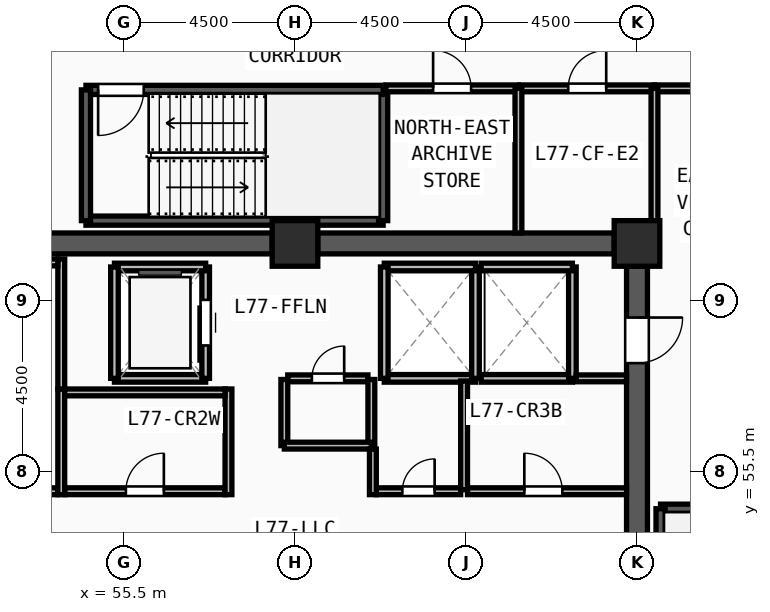
"""IFC4 building model, lengths in metres.
Left out: names, types, materials, properties, quantities, classifications, styles, units other than length and angle.
Written with IfcOpenShell. Run it as: python <this file> out.ifc"""

import sys

from ifc_helpers import new_model, si_unit, direction, frame, frame_2d, origin, origin_2d, place, context, subcontext, project, spatial, rectangle, extrude, source, transform, mapped, element, fill, save


model = new_model("IFC4")
c1 = context("Model", 3, precision=1e-05, world=origin(), true_north=direction((0.0, 1.0)))
c2 = subcontext(c1, "Body", "Model", "MODEL_VIEW")
j1 = project(units=[si_unit("LENGTHUNIT", "METRE"), si_unit("PLANEANGLEUNIT", "RADIAN")], contexts=[c1])
p1 = place(None, origin())
s1 = spatial("IfcSite", under=j1, at=p1, CompositionType="ELEMENT")
p2 = place(p1, origin())
s2 = spatial("IfcBuilding", under=s1, at=p2, CompositionType="ELEMENT")
p3 = place(p2, frame((0.0, 0.0, 297.75)))
s3 = spatial("IfcBuildingStorey", under=s2, at=p3, CompositionType="ELEMENT", Elevation=297.75)
m1 = source(origin(), c2, "Body", "SweptSolid", [
    extrude(rectangle(XDim=1.2, YDim=1.2, at=origin_2d()), origin(), (0.0, 0.0, 1.0), 3.75),
])
for number, where, z_axis, x_axis in (
    (1, (69.0, 61.5, 0.0), (0.0, 0.0, 1.0), (1.0, 0.0, 0.0)),
    (2, (60.0, 61.5, 0.0), (0.0, 0.0, 1.0), (1.0, 0.0, 0.0)),
):
    element("IfcColumn", number, at=place(p3, frame(where, z_axis=z_axis, x_axis=x_axis)), inside=s3, PredefinedType="COLUMN", context=c2, shape_type="MappedRepresentation", body=[
        mapped(m1, transform((0.0, 0.0, 0.0), x_axis=(1.0, 0.0, 0.0), y_axis=(0.0, 1.0, 0.0), z_axis=(0.0, 0.0, 1.0), scale=1.0)),
    ])
for number, where, z_axis, x_axis in (
    (3, (51.6, 61.5, 0.0), (0.0, 0.0, 1.0), (1.0, 0.0, 0.0)),
    (4, (60.6, 61.5, 0.0), (0.0, 0.0, 1.0), (1.0, 0.0, 0.0)),
):
    element("IfcWall", number, at=place(p3, frame(where, z_axis=z_axis, x_axis=x_axis)), inside=s3, PredefinedType="SHEAR", context=c2, shape_type="SweptSolid", body=[
        extrude(rectangle(XDim=7.8, YDim=0.55, at=frame_2d((3.9, 0.0))), origin(), (0.0, 0.0, 1.0), 3.57),
    ])
p4 = place(p3, frame((69.0, 60.9, 0.0), z_axis=(0.0, 0.0, 1.0), x_axis=(0.0, -1.0, 0.0)))
e5 = element("IfcWall", 5, at=p4, inside=s3, PredefinedType="SHEAR", context=c2, shape_type="SweptSolid", body=[
    extrude(rectangle(XDim=13.8, YDim=0.55, at=frame_2d((6.9, 0.0))), origin(), (0.0, 0.0, 1.0), 3.57),
])
m2 = source(origin(), c2, "Body", "SweptSolid", [
    extrude(rectangle(XDim=1.2, YDim=2.2, at=frame_2d((0.6, 1.1))), frame((0.0, 0.285, 0.0), z_axis=(0.0, -1.0, 0.0), x_axis=(1.0, 0.0, 0.0)), (0.0, 0.0, 1.0), 0.57),
])
p5 = place(p4, frame((1.35, 0.0, 0.0)))
e6 = element("IfcOpeningElement", 6, at=p5, cuts=e5, PredefinedType="OPENING", context=c2, shape_type="MappedRepresentation", body=[
    mapped(m2, transform((0.0, 0.0, 0.0), x_axis=(1.0, 0.0, 0.0), y_axis=(0.0, 1.0, 0.0), z_axis=(0.0, 0.0, 1.0), scale=1.0)),
])
p6 = place(p3, frame((73.06, 54.52, 0.0), z_axis=(0.0, 0.0, 1.0), x_axis=(-1.0, 0.0, 0.0)))
e7 = element("IfcWall", 7, at=p6, inside=s3, PredefinedType="SOLIDWALL", context=c2, shape_type="SweptSolid", body=[
    extrude(rectangle(XDim=3.44, YDim=0.24, at=frame_2d((1.72, 0.0))), origin(), (0.0, 0.0, 1.0), 3.57),
])
for number, where, z_axis, x_axis in (
    (8, (69.62, 54.52, 0.0), (0.0, 0.0, 1.0), (0.0, -1.0, 0.0)),
    (9, (54.5, 62.1, 0.0), (0.0, 0.0, 1.0), (1.0, 0.0, 0.0)),
):
    element("IfcWall", number, at=place(p3, frame(where, z_axis=z_axis, x_axis=x_axis)), inside=s3, PredefinedType="SOLIDWALL", context=c2, shape_type="SweptSolid", body=[
        extrude(rectangle(XDim=7.82, YDim=0.24, at=frame_2d((3.91, 0.0))), origin(), (0.0, 0.0, 1.0), 3.57),
    ])
p7 = place(p3, frame((62.32, 62.1, 0.0), z_axis=(0.0, 0.0, 1.0), x_axis=(0.0, 1.0, 0.0)))
e10 = element("IfcWall", 10, at=p7, inside=s3, PredefinedType="SOLIDWALL", context=c2, shape_type="SweptSolid", body=[
    extrude(rectangle(XDim=3.44, YDim=0.24, at=frame_2d((1.72, 0.0))), origin(), (0.0, 0.0, 1.0), 3.57),
])
p8 = place(p3, frame((62.32, 65.54, 0.0), z_axis=(0.0, 0.0, 1.0), x_axis=(-1.0, 0.0, 0.0)))
e11 = element("IfcWall", 11, at=p8, inside=s3, PredefinedType="SOLIDWALL", context=c2, shape_type="SweptSolid", body=[
    extrude(rectangle(XDim=7.82, YDim=0.24, at=frame_2d((3.91, 0.0))), origin(), (0.0, 0.0, 1.0), 3.57),
])
m3 = source(origin(), c2, "Body", "SweptSolid", [
    extrude(rectangle(XDim=1.2, YDim=2.2, at=frame_2d((0.6, 1.1))), frame((0.0, 0.13, 0.0), z_axis=(0.0, -1.0, 0.0), x_axis=(1.0, 0.0, 0.0)), (0.0, 0.0, 1.0), 0.26),
])
p9 = place(p8, frame((6.3, 0.0, 0.0)))
e12 = element("IfcOpeningElement", 12, at=p9, cuts=e11, PredefinedType="OPENING", context=c2, shape_type="MappedRepresentation", body=[
    mapped(m3, transform((0.0, 0.0, 0.0), x_axis=(1.0, 0.0, 0.0), y_axis=(0.0, 1.0, 0.0), z_axis=(0.0, 0.0, 1.0), scale=1.0)),
])
p10 = place(p3, frame((54.5, 65.54, 0.0), z_axis=(0.0, 0.0, 1.0), x_axis=(0.0, -1.0, 0.0)))
e13 = element("IfcWall", 13, at=p10, inside=s3, PredefinedType="SOLIDWALL", context=c2, shape_type="SweptSolid", body=[
    extrude(rectangle(XDim=3.44, YDim=0.24, at=frame_2d((1.72, 0.0))), origin(), (0.0, 0.0, 1.0), 3.57),
])
p11 = place(p3, frame((55.25, 57.95, 0.0), z_axis=(0.0, 0.0, 1.0), x_axis=(1.0, 0.0, 0.0)))
e14 = element("IfcWall", 14, at=p11, inside=s3, PredefinedType="SOLIDWALL", context=c2, shape_type="SweptSolid", body=[
    extrude(rectangle(XDim=2.4, YDim=0.2, at=frame_2d((1.2, 0.0))), origin(), (0.0, 0.0, 1.0), 3.57),
])
p12 = place(p3, frame((57.65, 57.95, 0.0), z_axis=(0.0, 0.0, 1.0), x_axis=(0.0, 1.0, 0.0)))
e15 = element("IfcWall", 15, at=p12, inside=s3, PredefinedType="SOLIDWALL", context=c2, shape_type="SweptSolid", body=[
    extrude(rectangle(XDim=2.93, YDim=0.2, at=frame_2d((1.465, 0.0))), origin(), (0.0, 0.0, 1.0), 3.57),
])
m4 = source(origin(), c2, "Body", "SweptSolid", [
    extrude(rectangle(XDim=1.2, YDim=2.3, at=frame_2d((0.6, 1.15))), frame((0.0, 0.11, 0.0), z_axis=(0.0, -1.0, 0.0), x_axis=(1.0, 0.0, 0.0)), (0.0, 0.0, 1.0), 0.22),
])
p13 = place(p12, frame((0.865, 0.0, 0.0)))
e16 = element("IfcOpeningElement", 16, at=p13, cuts=e15, PredefinedType="OPENING", context=c2, shape_type="MappedRepresentation", body=[
    mapped(m4, transform((0.0, 0.0, 0.0), x_axis=(1.0, 0.0, 0.0), y_axis=(0.0, 1.0, 0.0), z_axis=(0.0, 0.0, 1.0), scale=1.0)),
])
p14 = place(p3, frame((57.65, 60.88, 0.0), z_axis=(0.0, 0.0, 1.0), x_axis=(-1.0, 0.0, 0.0)))
e17 = element("IfcWall", 17, at=p14, inside=s3, PredefinedType="SOLIDWALL", context=c2, shape_type="SweptSolid", body=[
    extrude(rectangle(XDim=2.4, YDim=0.2, at=frame_2d((1.2, 0.0))), origin(), (0.0, 0.0, 1.0), 3.57),
])
p15 = place(p3, frame((55.25, 60.88, 0.0), z_axis=(0.0, 0.0, 1.0), x_axis=(0.0, -1.0, 0.0)))
e18 = element("IfcWall", 18, at=p15, inside=s3, PredefinedType="SOLIDWALL", context=c2, shape_type="SweptSolid", body=[
    extrude(rectangle(XDim=2.93, YDim=0.2, at=frame_2d((1.465, 0.0))), origin(), (0.0, 0.0, 1.0), 3.57),
])
p16 = place(p3, frame((62.35, 57.95, 0.0), z_axis=(0.0, 0.0, 1.0), x_axis=(1.0, 0.0, 0.0)))
e19 = element("IfcWall", 19, at=p16, inside=s3, PredefinedType="SOLIDWALL", context=c2, shape_type="SweptSolid", body=[
    extrude(rectangle(XDim=2.4, YDim=0.2, at=frame_2d((1.2, 0.0))), origin(), (0.0, 0.0, 1.0), 3.57),
])
p17 = place(p3, frame((64.75, 57.95, 0.0), z_axis=(0.0, 0.0, 1.0), x_axis=(0.0, 1.0, 0.0)))
e20 = element("IfcWall", 20, at=p17, inside=s3, PredefinedType="SOLIDWALL", context=c2, shape_type="SweptSolid", body=[
    extrude(rectangle(XDim=2.93, YDim=0.2, at=frame_2d((1.465, 0.0))), origin(), (0.0, 0.0, 1.0), 3.57),
])
p18 = place(p3, frame((64.75, 60.88, 0.0), z_axis=(0.0, 0.0, 1.0), x_axis=(-1.0, 0.0, 0.0)))
e21 = element("IfcWall", 21, at=p18, inside=s3, PredefinedType="SOLIDWALL", context=c2, shape_type="SweptSolid", body=[
    extrude(rectangle(XDim=2.4, YDim=0.2, at=frame_2d((1.2, 0.0))), origin(), (0.0, 0.0, 1.0), 3.57),
])
p19 = place(p3, frame((62.35, 60.88, 0.0), z_axis=(0.0, 0.0, 1.0), x_axis=(0.0, -1.0, 0.0)))
e22 = element("IfcWall", 22, at=p19, inside=s3, PredefinedType="SOLIDWALL", context=c2, shape_type="SweptSolid", body=[
    extrude(rectangle(XDim=2.93, YDim=0.2, at=frame_2d((1.465, 0.0))), origin(), (0.0, 0.0, 1.0), 3.57),
])
p20 = place(p3, frame((64.9, 57.95, 0.0), z_axis=(0.0, 0.0, 1.0), x_axis=(1.0, 0.0, 0.0)))
e23 = element("IfcWall", 23, at=p20, inside=s3, PredefinedType="SOLIDWALL", context=c2, shape_type="SweptSolid", body=[
    extrude(rectangle(XDim=2.4, YDim=0.2, at=frame_2d((1.2, 0.0))), origin(), (0.0, 0.0, 1.0), 3.57),
])
p21 = place(p3, frame((67.3, 57.95, 0.0), z_axis=(0.0, 0.0, 1.0), x_axis=(0.0, 1.0, 0.0)))
e24 = element("IfcWall", 24, at=p21, inside=s3, PredefinedType="SOLIDWALL", context=c2, shape_type="SweptSolid", body=[
    extrude(rectangle(XDim=2.93, YDim=0.2, at=frame_2d((1.465, 0.0))), origin(), (0.0, 0.0, 1.0), 3.57),
])
p22 = place(p3, frame((67.3, 60.88, 0.0), z_axis=(0.0, 0.0, 1.0), x_axis=(-1.0, 0.0, 0.0)))
e25 = element("IfcWall", 25, at=p22, inside=s3, PredefinedType="SOLIDWALL", context=c2, shape_type="SweptSolid", body=[
    extrude(rectangle(XDim=2.4, YDim=0.2, at=frame_2d((1.2, 0.0))), origin(), (0.0, 0.0, 1.0), 3.57),
])
p23 = place(p3, frame((53.94, 54.98, 0.0), z_axis=(0.0, 0.0, 1.0), x_axis=(1.0, 0.0, 0.0)))
e26 = element("IfcWall", 26, at=p23, inside=s3, PredefinedType="PARTITIONING", context=c2, shape_type="SweptSolid", body=[
    extrude(rectangle(XDim=4.22, YDim=0.18, at=frame_2d((2.11, 0.0))), origin(), (0.0, 0.0, 1.0), 3.57),
])
m5 = source(origin(), c2, "Body", "SweptSolid", [
    extrude(rectangle(XDim=1.0, YDim=2.2, at=frame_2d((0.5, 1.1))), frame((0.0, 0.1, 0.0), z_axis=(0.0, -1.0, 0.0), x_axis=(1.0, 0.0, 0.0)), (0.0, 0.0, 1.0), 0.2),
])
p24 = place(p23, frame((1.61, 0.0, 0.0)))
e27 = element("IfcOpeningElement", 27, at=p24, cuts=e26, PredefinedType="OPENING", context=c2, shape_type="MappedRepresentation", body=[
    mapped(m5, transform((0.0, 0.0, 0.0), x_axis=(1.0, 0.0, 0.0), y_axis=(0.0, 1.0, 0.0), z_axis=(0.0, 0.0, 1.0), scale=1.0)),
])
p25 = place(p3, frame((51.275, 54.98, 0.0), z_axis=(0.0, 0.0, 1.0), x_axis=(1.0, 0.0, 0.0)))
e28 = element("IfcWall", 28, at=p25, inside=s3, PredefinedType="PARTITIONING", context=c2, shape_type="SweptSolid", body=[
    extrude(rectangle(XDim=2.485, YDim=0.18, at=frame_2d((1.243, 0.0))), origin(), (0.0, 0.0, 1.0), 3.57),
])
m6 = source(origin(), c2, "Body", "SweptSolid", [
    extrude(rectangle(XDim=0.85, YDim=2.1, at=frame_2d((0.425, 1.05))), frame((0.0, 0.1, 0.0), z_axis=(0.0, -1.0, 0.0), x_axis=(1.0, 0.0, 0.0)), (0.0, 0.0, 1.0), 0.2),
])
p26 = place(p25, frame((0.915, 0.0, 0.0)))
e29 = element("IfcOpeningElement", 29, at=p26, cuts=e28, PredefinedType="OPENING", context=c2, shape_type="MappedRepresentation", body=[
    mapped(m6, transform((0.0, 0.0, 0.0), x_axis=(1.0, 0.0, 0.0), y_axis=(0.0, 1.0, 0.0), z_axis=(0.0, 0.0, 1.0), scale=1.0)),
])
p27 = place(p3, frame((62.14, 54.98, 0.0), z_axis=(0.0, 0.0, 1.0), x_axis=(1.0, 0.0, 0.0)))
e30 = element("IfcWall", 30, at=p27, inside=s3, PredefinedType="PARTITIONING", context=c2, shape_type="SweptSolid", body=[
    extrude(rectangle(XDim=2.22, YDim=0.18, at=frame_2d((1.11, 0.0))), origin(), (0.0, 0.0, 1.0), 3.57),
])
p28 = place(p27, frame((0.685, 0.0, 0.0)))
e31 = element("IfcOpeningElement", 31, at=p28, cuts=e30, PredefinedType="OPENING", context=c2, shape_type="MappedRepresentation", body=[
    mapped(m6, transform((0.0, 0.0, 0.0), x_axis=(1.0, 0.0, 0.0), y_axis=(0.0, 1.0, 0.0), z_axis=(0.0, 0.0, 1.0), scale=1.0)),
])
p29 = place(p3, frame((64.54, 54.98, 0.0), z_axis=(0.0, 0.0, 1.0), x_axis=(1.0, 0.0, 0.0)))
e32 = element("IfcWall", 32, at=p29, inside=s3, PredefinedType="PARTITIONING", context=c2, shape_type="SweptSolid", body=[
    extrude(rectangle(XDim=4.185, YDim=0.18, at=frame_2d((2.093, 0.0))), origin(), (0.0, 0.0, 1.0), 3.57),
])
p30 = place(p29, frame((1.495, 0.0, 0.0)))
e33 = element("IfcOpeningElement", 33, at=p30, cuts=e32, PredefinedType="OPENING", context=c2, shape_type="MappedRepresentation", body=[
    mapped(m5, transform((0.0, 0.0, 0.0), x_axis=(1.0, 0.0, 0.0), y_axis=(0.0, 1.0, 0.0), z_axis=(0.0, 0.0, 1.0), scale=1.0)),
])
p31 = place(p3, frame((59.81, 57.95, 0.0), z_axis=(0.0, 0.0, 1.0), x_axis=(1.0, 0.0, 0.0)))
e34 = element("IfcWall", 34, at=p31, inside=s3, PredefinedType="PARTITIONING", context=c2, shape_type="SweptSolid", body=[
    extrude(rectangle(XDim=2.11, YDim=0.18, at=frame_2d((1.055, 0.0))), origin(), (0.0, 0.0, 1.0), 3.57),
])
p32 = place(p31, frame((0.635, 0.0, 0.0)))
e35 = element("IfcOpeningElement", 35, at=p32, cuts=e34, PredefinedType="OPENING", context=c2, shape_type="MappedRepresentation", body=[
    mapped(m6, transform((0.0, 0.0, 0.0), x_axis=(1.0, 0.0, 0.0), y_axis=(0.0, 1.0, 0.0), z_axis=(0.0, 0.0, 1.0), scale=1.0)),
])
p33 = place(p3, frame((62.39, 65.58, 0.0), z_axis=(0.0, 0.0, 1.0), x_axis=(1.0, 0.0, 0.0)))
e36 = element("IfcWall", 36, at=p33, inside=s3, PredefinedType="PARTITIONING", context=c2, shape_type="SweptSolid", body=[
    extrude(rectangle(XDim=3.49, YDim=0.18, at=frame_2d((1.745, 0.0))), origin(), (0.0, 0.0, 1.0), 3.57),
])
p34 = place(p33, frame((1.245, 0.0, 0.0)))
e37 = element("IfcOpeningElement", 37, at=p34, cuts=e36, PredefinedType="OPENING", context=c2, shape_type="MappedRepresentation", body=[
    mapped(m5, transform((0.0, 0.0, 0.0), x_axis=(1.0, 0.0, 0.0), y_axis=(0.0, 1.0, 0.0), z_axis=(0.0, 0.0, 1.0), scale=1.0)),
])
p35 = place(p3, frame((65.92, 65.58, 0.0), z_axis=(0.0, 0.0, 1.0), x_axis=(1.0, 0.0, 0.0)))
e38 = element("IfcWall", 38, at=p35, inside=s3, PredefinedType="PARTITIONING", context=c2, shape_type="SweptSolid", body=[
    extrude(rectangle(XDim=3.54, YDim=0.18, at=frame_2d((1.77, 0.0))), origin(), (0.0, 0.0, 1.0), 3.57),
])
p36 = place(p35, frame((1.27, 0.0, 0.0)))
e39 = element("IfcOpeningElement", 39, at=p36, cuts=e38, PredefinedType="OPENING", context=c2, shape_type="MappedRepresentation", body=[
    mapped(m5, transform((0.0, 0.0, 0.0), x_axis=(1.0, 0.0, 0.0), y_axis=(0.0, 1.0, 0.0), z_axis=(0.0, 0.0, 1.0), scale=1.0)),
])
p37 = place(p3, frame((69.46, 65.58, 0.0), z_axis=(0.0, 0.0, 1.0), x_axis=(1.0, 0.0, 0.0)))
e40 = element("IfcWall", 40, at=p37, inside=s3, PredefinedType="PARTITIONING", context=c2, shape_type="SweptSolid", body=[
    extrude(rectangle(XDim=3.84, YDim=0.18, at=frame_2d((1.92, 0.0))), origin(), (0.0, 0.0, 1.0), 3.57),
])
m7 = source(origin(), c2, "Body", "SweptSolid", [
    extrude(rectangle(XDim=1.3, YDim=2.2, at=frame_2d((0.65, 1.1))), frame((0.0, 0.1, 0.0), z_axis=(0.0, -1.0, 0.0), x_axis=(1.0, 0.0, 0.0)), (0.0, 0.0, 1.0), 0.2),
])
p38 = place(p37, frame((1.27, 0.0, 0.0)))
e41 = element("IfcOpeningElement", 41, at=p38, cuts=e40, PredefinedType="OPENING", context=c2, shape_type="MappedRepresentation", body=[
    mapped(m7, transform((0.0, 0.0, 0.0), x_axis=(1.0, 0.0, 0.0), y_axis=(0.0, 1.0, 0.0), z_axis=(0.0, 0.0, 1.0), scale=1.0)),
])
p39 = place(p3, frame((64.45, 55.02, 0.0), z_axis=(0.0, 0.0, 1.0), x_axis=(0.0, 1.0, 0.0)))
e42 = element("IfcWall", 42, at=p39, inside=s3, PredefinedType="PARTITIONING", context=c2, shape_type="SweptSolid", body=[
    extrude(rectangle(XDim=2.86, YDim=0.18, at=frame_2d((1.43, 0.0))), origin(), (0.0, 0.0, 1.0), 3.57),
])
for number, where, z_axis, x_axis in (
    (43, (59.72, 56.18, 0.0), (0.0, 0.0, 1.0), (0.0, 1.0, 0.0)),
    (44, (62.01, 56.18, 0.0), (0.0, 0.0, 1.0), (0.0, 1.0, 0.0)),
):
    element("IfcWall", number, at=place(p3, frame(where, z_axis=z_axis, x_axis=x_axis)), inside=s3, PredefinedType="PARTITIONING", context=c2, shape_type="SweptSolid", body=[
        extrude(rectangle(XDim=1.74, YDim=0.18, at=frame_2d((0.87, 0.0))), origin(), (0.0, 0.0, 1.0), 3.57),
    ])
p40 = place(p3, frame((59.72, 56.18, 0.0), z_axis=(0.0, 0.0, 1.0), x_axis=(1.0, 0.0, 0.0)))
e45 = element("IfcWall", 45, at=p40, inside=s3, PredefinedType="PARTITIONING", context=c2, shape_type="SweptSolid", body=[
    extrude(rectangle(XDim=2.29, YDim=0.18, at=frame_2d((1.145, 0.0))), origin(), (0.0, 0.0, 1.0), 3.57),
])
p41 = place(p3, frame((65.88, 61.775, 0.0), z_axis=(0.0, 0.0, 1.0), x_axis=(0.0, 1.0, 0.0)))
e46 = element("IfcWall", 46, at=p41, inside=s3, PredefinedType="PARTITIONING", context=c2, shape_type="SweptSolid", body=[
    extrude(rectangle(XDim=3.805, YDim=0.18, at=frame_2d((1.903, 0.0))), origin(), (0.0, 0.0, 1.0), 3.57),
])
p42 = place(p3, frame((69.46, 61.95, 0.0), z_axis=(0.0, 0.0, 1.0), x_axis=(0.0, 1.0, 0.0)))
e47 = element("IfcWall", 47, at=p42, inside=s3, PredefinedType="PARTITIONING", context=c2, shape_type="SweptSolid", body=[
    extrude(rectangle(XDim=3.63, YDim=0.18, at=frame_2d((1.815, 0.0))), origin(), (0.0, 0.0, 1.0), 3.57),
])
for number, where, z_axis, x_axis in (
    (48, (53.85, 54.89, 0.0), (0.0, 0.0, 1.0), (0.0, 1.0, 0.0)),
    (49, (58.25, 54.89, 0.0), (0.0, 0.0, 1.0), (0.0, 1.0, 0.0)),
):
    element("IfcWall", number, at=place(p3, frame(where, z_axis=z_axis, x_axis=x_axis)), inside=s3, PredefinedType="PARTITIONING", context=c2, shape_type="SweptSolid", body=[
        extrude(rectangle(XDim=2.78, YDim=0.18, at=frame_2d((1.39, 0.0))), origin(), (0.0, 0.0, 1.0), 3.57),
    ])
p43 = place(p3, frame((53.94, 57.58, 0.0), z_axis=(0.0, 0.0, 1.0), x_axis=(1.0, 0.0, 0.0)))
e50 = element("IfcWall", 50, at=p43, inside=s3, PredefinedType="PARTITIONING", context=c2, shape_type="SweptSolid", body=[
    extrude(rectangle(XDim=4.22, YDim=0.18, at=frame_2d((2.11, 0.0))), origin(), (0.0, 0.0, 1.0), 3.57),
])
p44 = place(p3, frame((53.85, 57.67, 0.0), z_axis=(0.0, 0.0, 1.0), x_axis=(0.0, 1.0, 0.0)))
e51 = element("IfcWall", 51, at=p44, inside=s3, PredefinedType="PARTITIONING", context=c2, shape_type="SweptSolid", body=[
    extrude(rectangle(XDim=3.42, YDim=0.18, at=frame_2d((1.71, 0.0))), origin(), (0.0, 0.0, 1.0), 3.57),
])
p45 = place(p3, frame((51.437, 61.0, 0.0), z_axis=(0.0, 0.0, 1.0), x_axis=(1.0, 0.0, 0.0)))
e52 = element("IfcWall", 52, at=p45, inside=s3, PredefinedType="PARTITIONING", context=c2, shape_type="SweptSolid", body=[
    extrude(rectangle(XDim=2.323, YDim=0.18, at=frame_2d((1.162, 0.0))), origin(), (0.0, 0.0, 1.0), 3.57),
])
p46 = place(p3, frame((62.05, 54.89, 0.0), z_axis=(0.0, 0.0, 1.0), x_axis=(0.0, 1.0, 0.0)))
e53 = element("IfcWall", 53, at=p46, inside=s3, PredefinedType="PARTITIONING", context=c2, shape_type="SweptSolid", body=[
    extrude(rectangle(XDim=1.2, YDim=0.18, at=frame_2d((0.6, 0.0))), origin(), (0.0, 0.0, 1.0), 3.57),
])
p47 = place(p3, frame((67.4, 57.95, 0.0), z_axis=(0.0, 0.0, 1.0), x_axis=(1.0, 0.0, 0.0)))
e54 = element("IfcWall", 54, at=p47, inside=s3, PredefinedType="PARTITIONING", context=c2, shape_type="SweptSolid", body=[
    extrude(rectangle(XDim=1.325, YDim=0.18, at=frame_2d((0.663, 0.0))), origin(), (0.0, 0.0, 1.0), 3.57),
])
m8 = source(origin(), c2, "Body", "SweptSolid", [
    extrude(rectangle(XDim=1.2, YDim=2.2, at=frame_2d((0.6, 1.1))), frame((0.0, 0.025, 0.0), z_axis=(0.0, -1.0, 0.0), x_axis=(1.0, 0.0, 0.0)), (0.0, 0.0, 1.0), 0.05),
])
p48 = place(p5, origin())
e55 = element("IfcDoor", 55, at=p48, inside=s3, OperationType="SINGLE_SWING_LEFT", PredefinedType="DOOR", context=c2, shape_type="MappedRepresentation", body=[
    mapped(m8, transform((0.0, 0.0, 0.0), x_axis=(1.0, 0.0, 0.0), y_axis=(0.0, 1.0, 0.0), z_axis=(0.0, 0.0, 1.0), scale=1.0)),
])
fill(e6, e55)
p49 = place(p9, origin())
e56 = element("IfcDoor", 56, at=p49, inside=s3, OperationType="SINGLE_SWING_RIGHT", PredefinedType="DOOR", context=c2, shape_type="MappedRepresentation", body=[
    mapped(m8, transform((0.0, 0.0, 0.0), x_axis=(1.0, 0.0, 0.0), y_axis=(0.0, 1.0, 0.0), z_axis=(0.0, 0.0, 1.0), scale=1.0)),
])
fill(e12, e56)
m9 = source(origin(), c2, "Body", "SweptSolid", [
    extrude(rectangle(XDim=1.2, YDim=2.3, at=frame_2d((0.6, 1.15))), frame((0.0, 0.025, 0.0), z_axis=(0.0, -1.0, 0.0), x_axis=(1.0, 0.0, 0.0)), (0.0, 0.0, 1.0), 0.05),
])
p50 = place(p13, origin())
e57 = element("IfcDoor", 57, at=p50, inside=s3, OperationType="SLIDING_TO_LEFT", PredefinedType="DOOR", context=c2, shape_type="MappedRepresentation", body=[
    mapped(m9, transform((0.0, 0.0, 0.0), x_axis=(1.0, 0.0, 0.0), y_axis=(0.0, 1.0, 0.0), z_axis=(0.0, 0.0, 1.0), scale=1.0)),
])
fill(e16, e57)
m10 = source(origin(), c2, "Body", "SweptSolid", [
    extrude(rectangle(XDim=1.0, YDim=2.2, at=frame_2d((0.5, 1.1))), frame((0.0, 0.025, 0.0), z_axis=(0.0, -1.0, 0.0), x_axis=(1.0, 0.0, 0.0)), (0.0, 0.0, 1.0), 0.05),
])
p51 = place(p24, origin())
e58 = element("IfcDoor", 58, at=p51, inside=s3, OperationType="SINGLE_SWING_RIGHT", PredefinedType="DOOR", context=c2, shape_type="MappedRepresentation", body=[
    mapped(m10, transform((0.0, 0.0, 0.0), x_axis=(1.0, 0.0, 0.0), y_axis=(0.0, 1.0, 0.0), z_axis=(0.0, 0.0, 1.0), scale=1.0)),
])
fill(e27, e58)
m11 = source(origin(), c2, "Body", "SweptSolid", [
    extrude(rectangle(XDim=0.85, YDim=2.1, at=frame_2d((0.425, 1.05))), frame((0.0, 0.025, 0.0), z_axis=(0.0, -1.0, 0.0), x_axis=(1.0, 0.0, 0.0)), (0.0, 0.0, 1.0), 0.05),
])
p52 = place(p28, origin())
e59 = element("IfcDoor", 59, at=p52, inside=s3, OperationType="SINGLE_SWING_RIGHT", PredefinedType="DOOR", context=c2, shape_type="MappedRepresentation", body=[
    mapped(m11, transform((0.0, 0.0, 0.0), x_axis=(1.0, 0.0, 0.0), y_axis=(0.0, 1.0, 0.0), z_axis=(0.0, 0.0, 1.0), scale=1.0)),
])
fill(e31, e59)
p53 = place(p30, origin())
e60 = element("IfcDoor", 60, at=p53, inside=s3, OperationType="SINGLE_SWING_LEFT", PredefinedType="DOOR", context=c2, shape_type="MappedRepresentation", body=[
    mapped(m10, transform((0.0, 0.0, 0.0), x_axis=(1.0, 0.0, 0.0), y_axis=(0.0, 1.0, 0.0), z_axis=(0.0, 0.0, 1.0), scale=1.0)),
])
fill(e33, e60)
p54 = place(p32, origin())
e61 = element("IfcDoor", 61, at=p54, inside=s3, OperationType="SINGLE_SWING_RIGHT", PredefinedType="DOOR", context=c2, shape_type="MappedRepresentation", body=[
    mapped(m11, transform((0.0, 0.0, 0.0), x_axis=(1.0, 0.0, 0.0), y_axis=(0.0, 1.0, 0.0), z_axis=(0.0, 0.0, 1.0), scale=1.0)),
])
fill(e35, e61)
p55 = place(p34, origin())
e62 = element("IfcDoor", 62, at=p55, inside=s3, OperationType="SINGLE_SWING_LEFT", PredefinedType="DOOR", context=c2, shape_type="MappedRepresentation", body=[
    mapped(m10, transform((0.0, 0.0, 0.0), x_axis=(1.0, 0.0, 0.0), y_axis=(0.0, 1.0, 0.0), z_axis=(0.0, 0.0, 1.0), scale=1.0)),
])
fill(e37, e62)
p56 = place(p36, origin())
e63 = element("IfcDoor", 63, at=p56, inside=s3, OperationType="SINGLE_SWING_RIGHT", PredefinedType="DOOR", context=c2, shape_type="MappedRepresentation", body=[
    mapped(m10, transform((0.0, 0.0, 0.0), x_axis=(1.0, 0.0, 0.0), y_axis=(0.0, 1.0, 0.0), z_axis=(0.0, 0.0, 1.0), scale=1.0)),
])
fill(e39, e63)
save(model, sys.argv[1])
